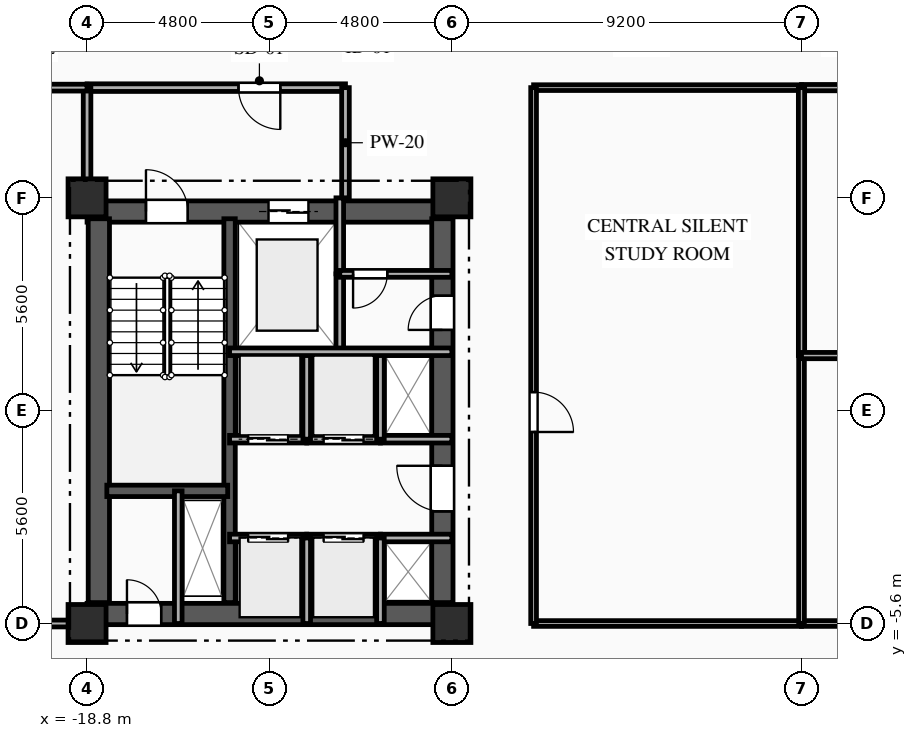
"""IFC4 building model, lengths in metres.
Left out: names, types, materials, properties, quantities, classifications, styles, units other than length and angle.
Written with IfcOpenShell. Run it as: python <this file> out.ifc"""

import sys

from ifc_helpers import new_model, si_unit, direction, frame, frame_2d, origin, origin_2d, place, context, subcontext, project, spatial, rectangle, extrude, element, fill, save


model = new_model("IFC4")
c1 = context("Model", 3, precision=1e-05, world=origin(), true_north=direction((0.0, 1.0)))
c2 = subcontext(c1, "Body", "Model", "MODEL_VIEW")
j1 = project(units=[si_unit("LENGTHUNIT", "METRE"), si_unit("PLANEANGLEUNIT", "RADIAN")], contexts=[c1])
p1 = place(None, origin())
s1 = spatial("IfcSite", under=j1, at=p1, CompositionType="ELEMENT")
p2 = place(p1, origin())
s2 = spatial("IfcBuilding", under=s1, at=p2, CompositionType="ELEMENT")
p3 = place(p2, frame((0.0, 0.0, 85.7)))
s3 = spatial("IfcBuildingStorey", under=s2, at=p3, CompositionType="ELEMENT", Elevation=85.7)
for number, where, z_axis, x_axis in (
    (1, (-18.8, -5.6, 0.0), (0.0, 0.0, 1.0), (1.0, 0.0, 0.0)),
    (2, (-18.8, 5.6, 0.0), (0.0, 0.0, 1.0), (1.0, 0.0, 0.0)),
    (3, (-9.2, -5.6, 0.0), (0.0, 0.0, 1.0), (1.0, 0.0, 0.0)),
    (4, (-9.2, 5.6, 0.0), (0.0, 0.0, 1.0), (1.0, 0.0, 0.0)),
):
    element("IfcColumn", number, at=place(p3, frame(where, z_axis=z_axis, x_axis=x_axis)), inside=s3, PredefinedType="COLUMN", context=c2, shape_type="SweptSolid", body=[
        extrude(rectangle(XDim=1.0, YDim=1.0, at=origin_2d()), origin(), (0.0, 0.0, 1.0), 3.35),
    ])
p4 = place(p3, frame((-18.8, 5.24, 0.0), z_axis=(0.0, 0.0, 1.0), x_axis=(1.0, 0.0, 0.0)))
e5 = element("IfcWall", 5, at=p4, inside=s3, PredefinedType="SHEAR", context=c2, shape_type="SweptSolid", body=[
    extrude(rectangle(XDim=9.6, YDim=0.56, at=frame_2d((4.8, 0.0))), origin(), (0.0, 0.0, 1.0), 3.045),
])
p5 = place(p4, frame((1.55, 0.0, 0.0)))
e6 = element("IfcOpeningElement", 6, at=p5, cuts=e5, PredefinedType="OPENING", context=c2, shape_type="SweptSolid", body=[
    extrude(rectangle(XDim=1.1, YDim=2.15, at=frame_2d((0.55, 1.075))), frame((0.0, 0.29, 0.0), z_axis=(0.0, -1.0, 0.0), x_axis=(1.0, 0.0, 0.0)), (0.0, 0.0, 1.0), 0.58),
])
p6 = place(p4, frame((4.775, 0.0, 0.0)))
e7 = element("IfcOpeningElement", 7, at=p6, cuts=e5, PredefinedType="OPENING", context=c2, shape_type="SweptSolid", body=[
    extrude(rectangle(XDim=1.05, YDim=2.1, at=frame_2d((0.525, 1.05))), frame((0.0, 0.29, 0.0), z_axis=(0.0, -1.0, 0.0), x_axis=(1.0, 0.0, 0.0)), (0.0, 0.0, 1.0), 0.58),
])
p7 = place(p3, frame((-18.8, -5.35, 0.0), z_axis=(0.0, 0.0, 1.0), x_axis=(1.0, 0.0, 0.0)))
e8 = element("IfcWall", 8, at=p7, inside=s3, PredefinedType="SHEAR", context=c2, shape_type="SweptSolid", body=[
    extrude(rectangle(XDim=9.6, YDim=0.56, at=frame_2d((4.8, 0.0))), origin(), (0.0, 0.0, 1.0), 3.045),
])
p8 = place(p7, frame((1.05, 0.0, 0.0)))
e9 = element("IfcOpeningElement", 9, at=p8, cuts=e8, PredefinedType="OPENING", context=c2, shape_type="SweptSolid", body=[
    extrude(rectangle(XDim=0.9, YDim=2.1, at=frame_2d((0.45, 1.05))), frame((0.0, 0.29, 0.0), z_axis=(0.0, -1.0, 0.0), x_axis=(1.0, 0.0, 0.0)), (0.0, 0.0, 1.0), 0.58),
])
p9 = place(p3, frame((-18.49, -5.05, 0.0), z_axis=(0.0, 0.0, 1.0), x_axis=(0.0, 1.0, 0.0)))
e10 = element("IfcWall", 10, at=p9, inside=s3, PredefinedType="SHEAR", context=c2, shape_type="SweptSolid", body=[
    extrude(rectangle(XDim=10.1, YDim=0.56, at=frame_2d((5.05, 0.0))), origin(), (0.0, 0.0, 1.0), 3.045),
])
p10 = place(p3, frame((-9.45, -5.05, 0.0), z_axis=(0.0, 0.0, 1.0), x_axis=(0.0, 1.0, 0.0)))
e11 = element("IfcWall", 11, at=p10, inside=s3, PredefinedType="SHEAR", context=c2, shape_type="SweptSolid", body=[
    extrude(rectangle(XDim=10.1, YDim=0.56, at=frame_2d((5.05, 0.0))), origin(), (0.0, 0.0, 1.0), 3.045),
])
p11 = place(p10, frame((7.175, 0.0, 0.0)))
e12 = element("IfcOpeningElement", 12, at=p11, cuts=e11, PredefinedType="OPENING", context=c2, shape_type="SweptSolid", body=[
    extrude(rectangle(XDim=0.9, YDim=2.1, at=frame_2d((0.45, 1.05))), frame((0.0, 0.29, 0.0), z_axis=(0.0, -1.0, 0.0), x_axis=(1.0, 0.0, 0.0)), (0.0, 0.0, 1.0), 0.58),
])
p12 = place(p10, frame((2.4, 0.0, 0.0)))
e13 = element("IfcOpeningElement", 13, at=p12, cuts=e11, PredefinedType="OPENING", context=c2, shape_type="SweptSolid", body=[
    extrude(rectangle(XDim=1.2, YDim=2.15, at=frame_2d((0.6, 1.075))), frame((0.0, 0.29, 0.0), z_axis=(0.0, -1.0, 0.0), x_axis=(1.0, 0.0, 0.0)), (0.0, 0.0, 1.0), 0.58),
])
p13 = place(p3, frame((-15.05, -5.05, 0.0), z_axis=(0.0, 0.0, 1.0), x_axis=(0.0, 1.0, 0.0)))
e14 = element("IfcWall", 14, at=p13, inside=s3, PredefinedType="SHEAR", context=c2, shape_type="SweptSolid", body=[
    extrude(rectangle(XDim=10.1, YDim=0.3, at=frame_2d((5.05, 0.0))), origin(), (0.0, 0.0, 1.0), 3.045),
])
p14 = place(p3, frame((-18.28, -2.11, 0.0), z_axis=(0.0, 0.0, 1.0), x_axis=(1.0, 0.0, 0.0)))
e15 = element("IfcWall", 15, at=p14, inside=s3, PredefinedType="SHEAR", context=c2, shape_type="SweptSolid", body=[
    extrude(rectangle(XDim=3.18, YDim=0.3, at=frame_2d((1.59, 0.0))), origin(), (0.0, 0.0, 1.0), 3.045),
])
p15 = place(p3, frame((-16.4, -5.6, 0.0), z_axis=(0.0, 0.0, 1.0), x_axis=(0.0, 1.0, 0.0)))
e16 = element("IfcWall", 16, at=p15, inside=s3, PredefinedType="PARTITIONING", context=c2, shape_type="SweptSolid", body=[
    extrude(rectangle(XDim=3.49, YDim=0.2, at=frame_2d((1.745, 0.0))), origin(), (0.0, 0.0, 1.0), 3.045),
])
p16 = place(p3, frame((-12.15, 1.55, 0.0), z_axis=(0.0, 0.0, 1.0), x_axis=(0.0, 1.0, 0.0)))
e17 = element("IfcWall", 17, at=p16, inside=s3, PredefinedType="PARTITIONING", context=c2, shape_type="SweptSolid", body=[
    extrude(rectangle(XDim=2.05, YDim=0.2, at=frame_2d((1.025, 0.0))), origin(), (0.0, 0.0, 1.0), 3.045),
])
p17 = place(p3, frame((-12.15, 3.6, 0.0), z_axis=(0.0, 0.0, 1.0), x_axis=(0.0, 1.0, 0.0)))
e18 = element("IfcWall", 18, at=p17, inside=s3, PredefinedType="PARTITIONING", context=c2, shape_type="SweptSolid", body=[
    extrude(rectangle(XDim=2.0, YDim=0.2, at=frame_2d((1.0, 0.0))), origin(), (0.0, 0.0, 1.0), 3.045),
])
p18 = place(p3, frame((-12.0, 8.5, 0.0), z_axis=(0.0, 0.0, 1.0), x_axis=(-1.0, 0.0, 0.0)))
e19 = element("IfcWall", 19, at=p18, inside=s3, PredefinedType="PARTITIONING", context=c2, shape_type="SweptSolid", body=[
    extrude(rectangle(XDim=6.8, YDim=0.2, at=frame_2d((3.4, 0.0))), origin(), (0.0, 0.0, 1.0), 3.045),
])
p19 = place(p18, frame((1.715, 0.0, 0.0)))
e20 = element("IfcOpeningElement", 20, at=p19, cuts=e19, PredefinedType="OPENING", context=c2, shape_type="SweptSolid", body=[
    extrude(rectangle(XDim=1.1, YDim=2.15, at=frame_2d((0.55, 1.075))), frame((0.0, 0.11, 0.0), z_axis=(0.0, -1.0, 0.0), x_axis=(1.0, 0.0, 0.0)), (0.0, 0.0, 1.0), 0.22),
])
p20 = place(p3, frame((-12.0, 5.6, 0.0), z_axis=(0.0, 0.0, 1.0), x_axis=(0.0, 1.0, 0.0)))
e21 = element("IfcWall", 21, at=p20, inside=s3, PredefinedType="PARTITIONING", context=c2, shape_type="SweptSolid", body=[
    extrude(rectangle(XDim=2.9, YDim=0.2, at=frame_2d((1.45, 0.0))), origin(), (0.0, 0.0, 1.0), 3.045),
])
p21 = place(p3, frame((-18.8, 8.5, 0.0), z_axis=(0.0, 0.0, 1.0), x_axis=(0.0, -1.0, 0.0)))
e22 = element("IfcWall", 22, at=p21, inside=s3, PredefinedType="PARTITIONING", context=c2, shape_type="SweptSolid", body=[
    extrude(rectangle(XDim=2.9, YDim=0.2, at=frame_2d((1.45, 0.0))), origin(), (0.0, 0.0, 1.0), 2.53),
])
p22 = place(p3, frame((-9.2, 3.6, 0.0), z_axis=(0.0, 0.0, 1.0), x_axis=(-1.0, 0.0, 0.0)))
e23 = element("IfcWall", 23, at=p22, inside=s3, PredefinedType="PARTITIONING", context=c2, shape_type="SweptSolid", body=[
    extrude(rectangle(XDim=2.95, YDim=0.18, at=frame_2d((1.475, 0.0))), origin(), (0.0, 0.0, 1.0), 3.045),
])
p23 = place(p22, frame((1.7, 0.0, 0.0)))
e24 = element("IfcOpeningElement", 24, at=p23, cuts=e23, PredefinedType="OPENING", context=c2, shape_type="SweptSolid", body=[
    extrude(rectangle(XDim=0.9, YDim=2.1, at=frame_2d((0.45, 1.05))), frame((0.0, 0.1, 0.0), z_axis=(0.0, -1.0, 0.0), x_axis=(1.0, 0.0, 0.0)), (0.0, 0.0, 1.0), 0.2),
])
p24 = place(p3, frame((-15.05, -3.35, 0.0), z_axis=(0.0, 0.0, 1.0), x_axis=(1.0, 0.0, 0.0)))
e25 = element("IfcWall", 25, at=p24, inside=s3, PredefinedType="PARTITIONING", context=c2, shape_type="SweptSolid", body=[
    extrude(rectangle(XDim=2.03, YDim=0.2, at=frame_2d((1.015, 0.0))), origin(), (0.0, 0.0, 1.0), 3.045),
])
p25 = place(p24, frame((0.49, 0.0, 0.0)))
e26 = element("IfcOpeningElement", 26, at=p25, cuts=e25, PredefinedType="OPENING", context=c2, shape_type="SweptSolid", body=[
    extrude(rectangle(XDim=1.05, YDim=2.1, at=frame_2d((0.525, 1.05))), frame((0.0, 0.11, 0.0), z_axis=(0.0, -1.0, 0.0), x_axis=(1.0, 0.0, 0.0)), (0.0, 0.0, 1.0), 0.22),
])
p26 = place(p3, frame((-13.02, -3.35, 0.0), z_axis=(0.0, 0.0, 1.0), x_axis=(1.0, 0.0, 0.0)))
e27 = element("IfcWall", 27, at=p26, inside=s3, PredefinedType="PARTITIONING", context=c2, shape_type="SweptSolid", body=[
    extrude(rectangle(XDim=1.94, YDim=0.2, at=frame_2d((0.97, 0.0))), origin(), (0.0, 0.0, 1.0), 3.045),
])
p27 = place(p26, frame((0.445, 0.0, 0.0)))
e28 = element("IfcOpeningElement", 28, at=p27, cuts=e27, PredefinedType="OPENING", context=c2, shape_type="SweptSolid", body=[
    extrude(rectangle(XDim=1.05, YDim=2.1, at=frame_2d((0.525, 1.05))), frame((0.0, 0.11, 0.0), z_axis=(0.0, -1.0, 0.0), x_axis=(1.0, 0.0, 0.0)), (0.0, 0.0, 1.0), 0.22),
])
p28 = place(p3, frame((-11.08, -3.35, 0.0), z_axis=(0.0, 0.0, 1.0), x_axis=(1.0, 0.0, 0.0)))
e29 = element("IfcWall", 29, at=p28, inside=s3, PredefinedType="PARTITIONING", context=c2, shape_type="SweptSolid", body=[
    extrude(rectangle(XDim=1.88, YDim=0.2, at=frame_2d((0.94, 0.0))), origin(), (0.0, 0.0, 1.0), 2.76),
])
p29 = place(p3, frame((-13.02, -0.75, 0.0), z_axis=(0.0, 0.0, 1.0), x_axis=(-1.0, 0.0, 0.0)))
e30 = element("IfcWall", 30, at=p29, inside=s3, PredefinedType="PARTITIONING", context=c2, shape_type="SweptSolid", body=[
    extrude(rectangle(XDim=2.03, YDim=0.2, at=frame_2d((1.015, 0.0))), origin(), (0.0, 0.0, 1.0), 3.045),
])
p30 = place(p29, frame((0.49, 0.0, 0.0)))
e31 = element("IfcOpeningElement", 31, at=p30, cuts=e30, PredefinedType="OPENING", context=c2, shape_type="SweptSolid", body=[
    extrude(rectangle(XDim=1.05, YDim=2.1, at=frame_2d((0.525, 1.05))), frame((0.0, 0.11, 0.0), z_axis=(0.0, -1.0, 0.0), x_axis=(1.0, 0.0, 0.0)), (0.0, 0.0, 1.0), 0.22),
])
p31 = place(p3, frame((-11.08, -0.75, 0.0), z_axis=(0.0, 0.0, 1.0), x_axis=(-1.0, 0.0, 0.0)))
e32 = element("IfcWall", 32, at=p31, inside=s3, PredefinedType="PARTITIONING", context=c2, shape_type="SweptSolid", body=[
    extrude(rectangle(XDim=1.94, YDim=0.2, at=frame_2d((0.97, 0.0))), origin(), (0.0, 0.0, 1.0), 3.045),
])
p32 = place(p31, frame((0.445, 0.0, 0.0)))
e33 = element("IfcOpeningElement", 33, at=p32, cuts=e32, PredefinedType="OPENING", context=c2, shape_type="SweptSolid", body=[
    extrude(rectangle(XDim=1.05, YDim=2.1, at=frame_2d((0.525, 1.05))), frame((0.0, 0.11, 0.0), z_axis=(0.0, -1.0, 0.0), x_axis=(1.0, 0.0, 0.0)), (0.0, 0.0, 1.0), 0.22),
])
p33 = place(p3, frame((-9.2, -0.75, 0.0), z_axis=(0.0, 0.0, 1.0), x_axis=(-1.0, 0.0, 0.0)))
e34 = element("IfcWall", 34, at=p33, inside=s3, PredefinedType="PARTITIONING", context=c2, shape_type="SweptSolid", body=[
    extrude(rectangle(XDim=1.88, YDim=0.2, at=frame_2d((0.94, 0.0))), origin(), (0.0, 0.0, 1.0), 3.045),
])
for number, where, z_axis, x_axis in (
    (35, (-13.02, -5.6, 0.0), (0.0, 0.0, 1.0), (0.0, 1.0, 0.0)),
    (36, (-11.08, -5.6, 0.0), (0.0, 0.0, 1.0), (0.0, 1.0, 0.0)),
):
    element("IfcWall", number, at=place(p3, frame(where, z_axis=z_axis, x_axis=x_axis)), inside=s3, PredefinedType="PARTITIONING", context=c2, shape_type="SweptSolid", body=[
        extrude(rectangle(XDim=2.25, YDim=0.2, at=frame_2d((1.125, 0.0))), origin(), (0.0, 0.0, 1.0), 3.045),
    ])
for number, where, z_axis, x_axis in (
    (37, (-13.02, -0.75, 0.0), (0.0, 0.0, 1.0), (0.0, 1.0, 0.0)),
    (38, (-11.08, -0.75, 0.0), (0.0, 0.0, 1.0), (0.0, 1.0, 0.0)),
):
    element("IfcWall", number, at=place(p3, frame(where, z_axis=z_axis, x_axis=x_axis)), inside=s3, PredefinedType="PARTITIONING", context=c2, shape_type="SweptSolid", body=[
        extrude(rectangle(XDim=2.3, YDim=0.2, at=frame_2d((1.15, 0.0))), origin(), (0.0, 0.0, 1.0), 3.045),
    ])
p34 = place(p3, frame((-18.8, 8.5, 0.0), z_axis=(0.0, 0.0, 1.0), x_axis=(-1.0, 0.0, 0.0)))
e39 = element("IfcWall", 39, at=p34, inside=s3, PredefinedType="PARTITIONING", context=c2, shape_type="SweptSolid", body=[
    extrude(rectangle(XDim=2.65, YDim=0.18, at=frame_2d((1.325, 0.0))), origin(), (0.0, 0.0, 1.0), 3.045),
])
p35 = place(p34, frame((1.009, 0.0, 0.0)))
e40 = element("IfcOpeningElement", 40, at=p35, cuts=e39, PredefinedType="OPENING", context=c2, shape_type="SweptSolid", body=[
    extrude(rectangle(XDim=1.0, YDim=2.15, at=frame_2d((0.5, 1.075))), frame((0.0, 0.1, 0.0), z_axis=(0.0, -1.0, 0.0), x_axis=(1.0, 0.0, 0.0)), (0.0, 0.0, 1.0), 0.2),
])
p36 = place(p3, frame((0.0, 8.5, 0.0), z_axis=(0.0, 0.0, 1.0), x_axis=(-1.0, 0.0, 0.0)))
e41 = element("IfcWall", 41, at=p36, inside=s3, PredefinedType="PARTITIONING", context=c2, shape_type="SweptSolid", body=[
    extrude(rectangle(XDim=7.05, YDim=0.15, at=frame_2d((3.525, 0.0))), origin(), (0.0, 0.0, 1.0), 3.045),
])
p37 = place(p3, frame((7.05, 8.5, 0.0), z_axis=(0.0, 0.0, 1.0), x_axis=(-1.0, 0.0, 0.0)))
e42 = element("IfcWall", 42, at=p37, inside=s3, PredefinedType="PARTITIONING", context=c2, shape_type="SweptSolid", body=[
    extrude(rectangle(XDim=7.05, YDim=0.165, at=frame_2d((3.525, 0.0))), origin(), (0.0, 0.0, 1.0), 3.045),
])
p38 = place(p37, frame((4.728, 0.0, 0.0)))
e43 = element("IfcOpeningElement", 43, at=p38, cuts=e42, PredefinedType="OPENING", context=c2, shape_type="SweptSolid", body=[
    extrude(rectangle(XDim=1.15, YDim=2.15, at=frame_2d((0.575, 1.075))), frame((0.0, 0.093, 0.0), z_axis=(0.0, -1.0, 0.0), x_axis=(1.0, 0.0, 0.0)), (0.0, 0.0, 1.0), 0.185),
])
p39 = place(p3, frame((-21.45, -5.6, 0.0), z_axis=(0.0, 0.0, 1.0), x_axis=(1.0, 0.0, 0.0)))
e44 = element("IfcWall", 44, at=p39, inside=s3, PredefinedType="PARTITIONING", context=c2, shape_type="SweptSolid", body=[
    extrude(rectangle(XDim=2.65, YDim=0.18, at=frame_2d((1.325, 0.0))), origin(), (0.0, 0.0, 1.0), 3.045),
])
p40 = place(p3, frame((-7.05, -5.6, 0.0), z_axis=(0.0, 0.0, 1.0), x_axis=(1.0, 0.0, 0.0)))
e45 = element("IfcWall", 45, at=p40, inside=s3, PredefinedType="PARTITIONING", context=c2, shape_type="SweptSolid", body=[
    extrude(rectangle(XDim=7.05, YDim=0.15, at=frame_2d((3.525, 0.0))), origin(), (0.0, 0.0, 1.0), 2.53),
])
p41 = place(p3, frame((0.0, -5.6, 0.0), z_axis=(0.0, 0.0, 1.0), x_axis=(1.0, 0.0, 0.0)))
e46 = element("IfcWall", 46, at=p41, inside=s3, PredefinedType="PARTITIONING", context=c2, shape_type="SweptSolid", body=[
    extrude(rectangle(XDim=7.05, YDim=0.15, at=frame_2d((3.525, 0.0))), origin(), (0.0, 0.0, 1.0), 2.53),
])
p42 = place(p41, frame((1.185, 0.0, 0.0)))
e47 = element("IfcOpeningElement", 47, at=p42, cuts=e46, PredefinedType="OPENING", context=c2, shape_type="SweptSolid", body=[
    extrude(rectangle(XDim=1.05, YDim=2.15, at=frame_2d((0.525, 1.075))), frame((0.0, 0.085, 0.0), z_axis=(0.0, -1.0, 0.0), x_axis=(1.0, 0.0, 0.0)), (0.0, 0.0, 1.0), 0.17),
])
p43 = place(p3, frame((-7.05, 8.5, 0.0), z_axis=(0.0, 0.0, 1.0), x_axis=(0.0, -1.0, 0.0)))
e48 = element("IfcWall", 48, at=p43, inside=s3, PredefinedType="PARTITIONING", context=c2, shape_type="SweptSolid", body=[
    extrude(rectangle(XDim=14.1, YDim=0.15, at=frame_2d((7.05, 0.0))), origin(), (0.0, 0.0, 1.0), 3.045),
])
p44 = place(p43, frame((8.011, 0.0, 0.0)))
e49 = element("IfcOpeningElement", 49, at=p44, cuts=e48, PredefinedType="OPENING", context=c2, shape_type="SweptSolid", body=[
    extrude(rectangle(XDim=1.05, YDim=2.15, at=frame_2d((0.525, 1.075))), frame((0.0, 0.085, 0.0), z_axis=(0.0, -1.0, 0.0), x_axis=(1.0, 0.0, 0.0)), (0.0, 0.0, 1.0), 0.17),
])
p45 = place(p3, frame((0.0, 1.45, 0.0), z_axis=(0.0, 0.0, 1.0), x_axis=(0.0, -1.0, 0.0)))
e50 = element("IfcWall", 50, at=p45, inside=s3, PredefinedType="PARTITIONING", context=c2, shape_type="SweptSolid", body=[
    extrude(rectangle(XDim=7.05, YDim=0.15, at=frame_2d((3.525, 0.0))), origin(), (0.0, 0.0, 1.0), 3.045),
])
for number, where, z_axis, x_axis in (
    (51, (0.0, 8.5, 0.0), (0.0, 0.0, 1.0), (0.0, -1.0, 0.0)),
    (52, (0.0, 1.45, 0.0), (0.0, 0.0, 1.0), (1.0, 0.0, 0.0)),
):
    element("IfcWall", number, at=place(p3, frame(where, z_axis=z_axis, x_axis=x_axis)), inside=s3, PredefinedType="PARTITIONING", context=c2, shape_type="SweptSolid", body=[
        extrude(rectangle(XDim=7.05, YDim=0.165, at=frame_2d((3.525, 0.0))), origin(), (0.0, 0.0, 1.0), 3.045),
    ])
p46 = place(p3, frame((-15.05, 1.55, 0.0), z_axis=(0.0, 0.0, 1.0), x_axis=(1.0, 0.0, 0.0)))
e53 = element("IfcWall", 53, at=p46, inside=s3, PredefinedType="PARTITIONING", context=c2, shape_type="SweptSolid", body=[
    extrude(rectangle(XDim=5.85, YDim=0.2, at=frame_2d((2.925, 0.0))), origin(), (0.0, 0.0, 1.0), 3.045),
])
p47 = place(p5, origin())
e54 = element("IfcDoor", 54, at=p47, inside=s3, OperationType="SINGLE_SWING_LEFT", PredefinedType="DOOR", context=c2, shape_type="SweptSolid", body=[
    extrude(rectangle(XDim=1.1, YDim=2.15, at=frame_2d((0.55, 1.075))), frame((0.0, 0.025, 0.0), z_axis=(0.0, -1.0, 0.0), x_axis=(1.0, 0.0, 0.0)), (0.0, 0.0, 1.0), 0.05),
])
fill(e6, e54)
p48 = place(p6, origin())
e55 = element("IfcDoor", 55, at=p48, inside=s3, OperationType="DOUBLE_DOOR_SLIDING", PredefinedType="DOOR", context=c2, shape_type="SweptSolid", body=[
    extrude(rectangle(XDim=1.05, YDim=2.1, at=frame_2d((0.525, 1.05))), frame((0.0, 0.025, 0.0), z_axis=(0.0, -1.0, 0.0), x_axis=(1.0, 0.0, 0.0)), (0.0, 0.0, 1.0), 0.05),
])
fill(e7, e55)
p49 = place(p8, origin())
e56 = element("IfcDoor", 56, at=p49, inside=s3, OperationType="SINGLE_SWING_LEFT", PredefinedType="DOOR", context=c2, shape_type="SweptSolid", body=[
    extrude(rectangle(XDim=0.9, YDim=2.1, at=frame_2d((0.45, 1.05))), frame((0.0, 0.025, 0.0), z_axis=(0.0, -1.0, 0.0), x_axis=(1.0, 0.0, 0.0)), (0.0, 0.0, 1.0), 0.05),
])
fill(e9, e56)
p50 = place(p19, origin())
e57 = element("IfcDoor", 57, at=p50, inside=s3, OperationType="SINGLE_SWING_LEFT", PredefinedType="DOOR", context=c2, shape_type="SweptSolid", body=[
    extrude(rectangle(XDim=1.1, YDim=2.15, at=frame_2d((0.55, 1.075))), frame((0.0, 0.025, 0.0), z_axis=(0.0, -1.0, 0.0), x_axis=(1.0, 0.0, 0.0)), (0.0, 0.0, 1.0), 0.05),
])
fill(e20, e57)
p51 = place(p23, origin())
e58 = element("IfcDoor", 58, at=p51, inside=s3, OperationType="SINGLE_SWING_RIGHT", PredefinedType="DOOR", context=c2, shape_type="SweptSolid", body=[
    extrude(rectangle(XDim=0.9, YDim=2.1, at=frame_2d((0.45, 1.05))), frame((0.0, 0.025, 0.0), z_axis=(0.0, -1.0, 0.0), x_axis=(1.0, 0.0, 0.0)), (0.0, 0.0, 1.0), 0.05),
])
fill(e24, e58)
p52 = place(p11, origin())
e59 = element("IfcDoor", 59, at=p52, inside=s3, OperationType="SINGLE_SWING_LEFT", PredefinedType="DOOR", context=c2, shape_type="SweptSolid", body=[
    extrude(rectangle(XDim=0.9, YDim=2.1, at=frame_2d((0.45, 1.05))), frame((0.0, 0.025, 0.0), z_axis=(0.0, -1.0, 0.0), x_axis=(1.0, 0.0, 0.0)), (0.0, 0.0, 1.0), 0.05),
])
fill(e12, e59)
p53 = place(p25, origin())
e60 = element("IfcDoor", 60, at=p53, inside=s3, OperationType="DOUBLE_DOOR_SLIDING", PredefinedType="DOOR", context=c2, shape_type="SweptSolid", body=[
    extrude(rectangle(XDim=1.05, YDim=2.1, at=frame_2d((0.525, 1.05))), frame((0.0, 0.025, 0.0), z_axis=(0.0, -1.0, 0.0), x_axis=(1.0, 0.0, 0.0)), (0.0, 0.0, 1.0), 0.05),
])
fill(e26, e60)
p54 = place(p27, origin())
e61 = element("IfcDoor", 61, at=p54, inside=s3, OperationType="DOUBLE_DOOR_SLIDING", PredefinedType="DOOR", context=c2, shape_type="SweptSolid", body=[
    extrude(rectangle(XDim=1.05, YDim=2.1, at=frame_2d((0.525, 1.05))), frame((0.0, 0.025, 0.0), z_axis=(0.0, -1.0, 0.0), x_axis=(1.0, 0.0, 0.0)), (0.0, 0.0, 1.0), 0.05),
])
fill(e28, e61)
p55 = place(p30, origin())
e62 = element("IfcDoor", 62, at=p55, inside=s3, OperationType="DOUBLE_DOOR_SLIDING", PredefinedType="DOOR", context=c2, shape_type="SweptSolid", body=[
    extrude(rectangle(XDim=1.05, YDim=2.1, at=frame_2d((0.525, 1.05))), frame((0.0, 0.025, 0.0), z_axis=(0.0, -1.0, 0.0), x_axis=(1.0, 0.0, 0.0)), (0.0, 0.0, 1.0), 0.05),
])
fill(e31, e62)
p56 = place(p32, origin())
e63 = element("IfcDoor", 63, at=p56, inside=s3, OperationType="DOUBLE_DOOR_SLIDING", PredefinedType="DOOR", context=c2, shape_type="SweptSolid", body=[
    extrude(rectangle(XDim=1.05, YDim=2.1, at=frame_2d((0.525, 1.05))), frame((0.0, 0.025, 0.0), z_axis=(0.0, -1.0, 0.0), x_axis=(1.0, 0.0, 0.0)), (0.0, 0.0, 1.0), 0.05),
])
fill(e33, e63)
p57 = place(p12, origin())
e64 = element("IfcDoor", 64, at=p57, inside=s3, OperationType="SINGLE_SWING_RIGHT", PredefinedType="DOOR", context=c2, shape_type="SweptSolid", body=[
    extrude(rectangle(XDim=1.2, YDim=2.15, at=frame_2d((0.6, 1.075))), frame((0.0, 0.025, 0.0), z_axis=(0.0, -1.0, 0.0), x_axis=(1.0, 0.0, 0.0)), (0.0, 0.0, 1.0), 0.05),
])
fill(e13, e64)
p58 = place(p44, origin())
e65 = element("IfcDoor", 65, at=p58, inside=s3, OperationType="SINGLE_SWING_RIGHT", PredefinedType="DOOR", context=c2, shape_type="SweptSolid", body=[
    extrude(rectangle(XDim=1.05, YDim=2.15, at=frame_2d((0.525, 1.075))), frame((0.0, 0.025, 0.0), z_axis=(0.0, -1.0, 0.0), x_axis=(1.0, 0.0, 0.0)), (0.0, 0.0, 1.0), 0.05),
])
fill(e49, e65)
save(model, sys.argv[1])
